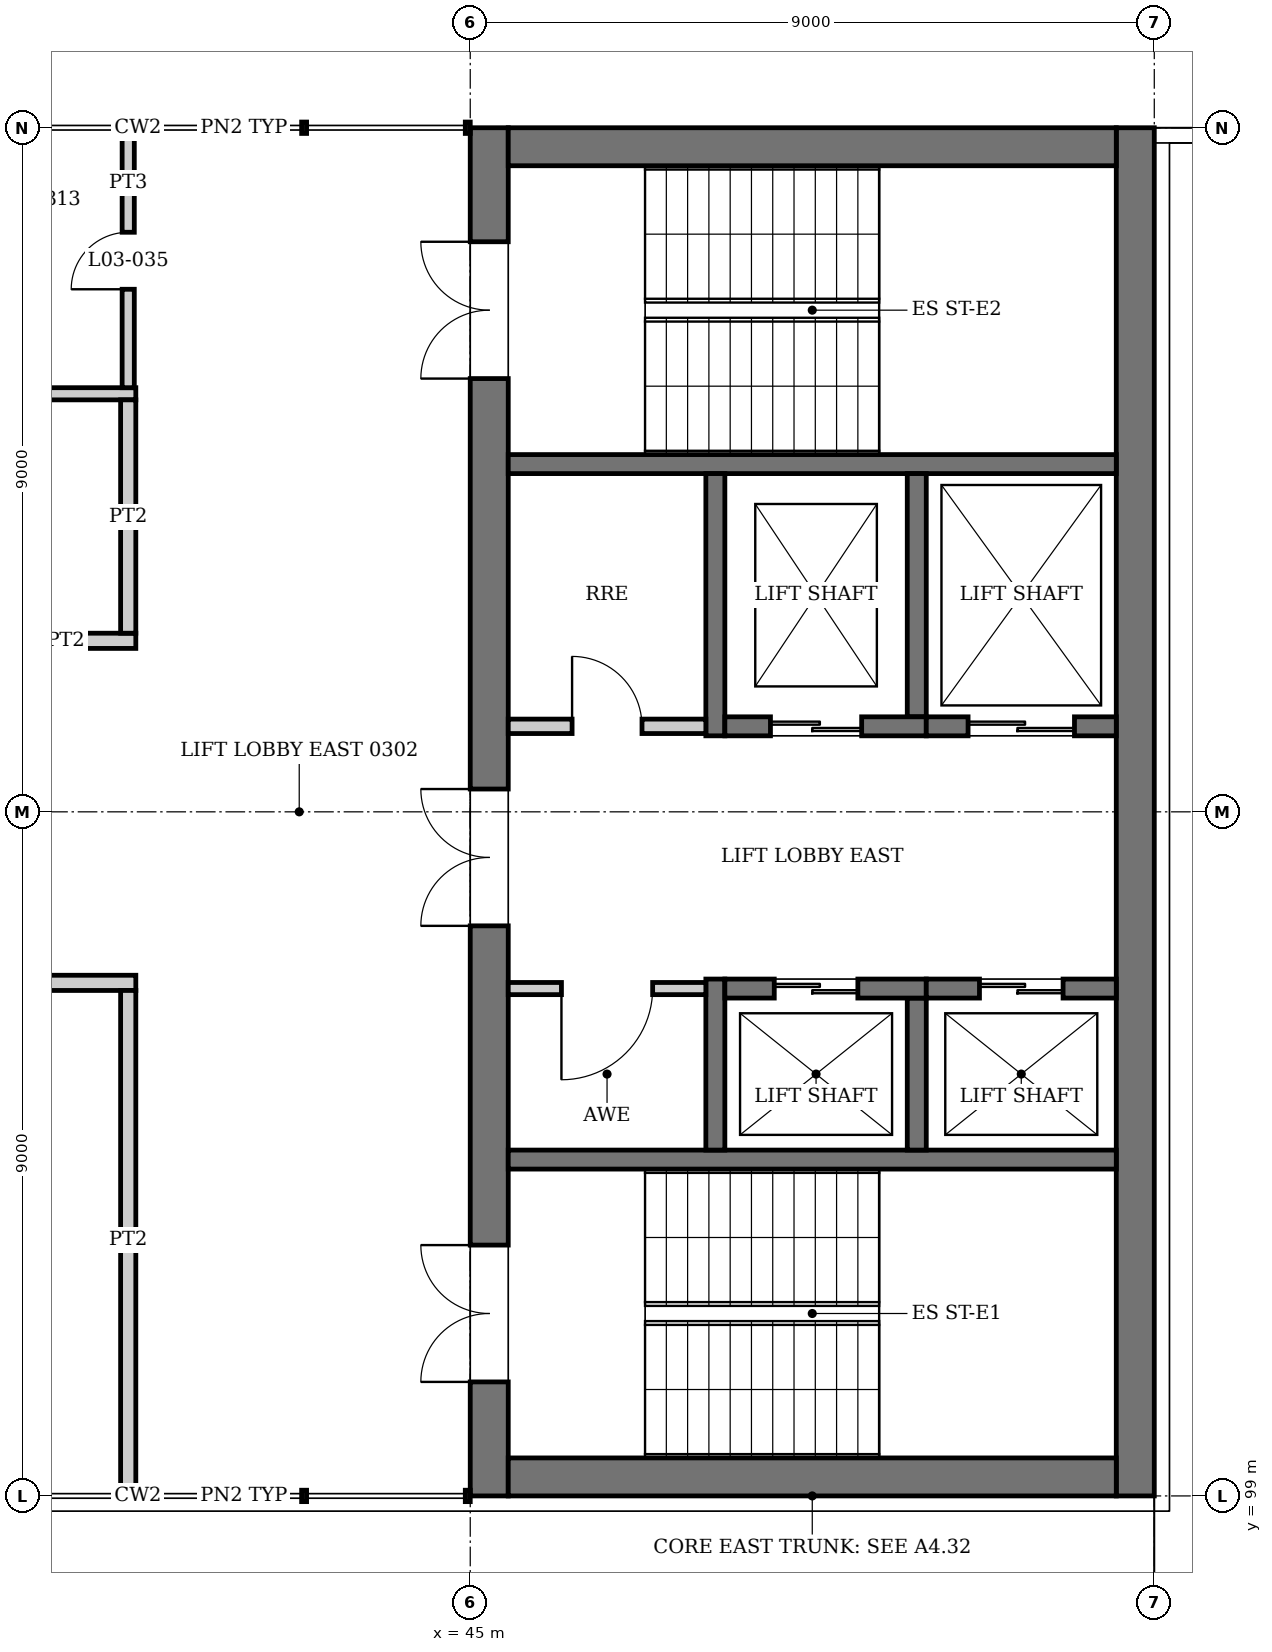
"""IFC4 building model, lengths in metres.
Left out: names, types, materials, properties, quantities, classifications, styles, units other than length and angle.
Written with IfcOpenShell. Run it as: python <this file> out.ifc"""

import sys

from ifc_helpers import new_model, si_unit, direction, frame, frame_2d, origin, place, context, subcontext, project, spatial, rectangle, extrude, element, fill, save


model = new_model("IFC4")
c1 = context("Model", 3, precision=1e-05, world=origin(), true_north=direction((0.0, 1.0)))
c2 = subcontext(c1, "Body", "Model", "MODEL_VIEW")
j1 = project(units=[si_unit("LENGTHUNIT", "METRE"), si_unit("PLANEANGLEUNIT", "RADIAN")], contexts=[c1])
p1 = place(None, origin())
s1 = spatial("IfcSite", under=j1, at=p1, CompositionType="ELEMENT")
p2 = place(p1, origin())
s2 = spatial("IfcBuilding", under=s1, at=p2, CompositionType="ELEMENT")
p3 = place(p2, frame((0.0, 0.0, 15.0)))
s3 = spatial("IfcBuildingStorey", under=s2, at=p3, CompositionType="ELEMENT", Elevation=15.0)
p4 = place(p3, frame((45.25, 99.0, 0.0), z_axis=(0.0, 0.0, 1.0), x_axis=(0.0, 1.0, 0.0)))
e1 = element("IfcWall", 1, at=p4, inside=s3, PredefinedType="SHEAR", context=c2, shape_type="SweptSolid", body=[
    extrude(rectangle(XDim=18.0, YDim=0.5, at=frame_2d((9.0, 0.0))), origin(), (0.0, 0.0, 1.0), 4.2),
])
p5 = place(p4, frame((1.5, 0.0, 0.0)))
e2 = element("IfcOpeningElement", 2, at=p5, cuts=e1, PredefinedType="OPENING", context=c2, shape_type="SweptSolid", body=[
    extrude(rectangle(XDim=1.8, YDim=2.1, at=frame_2d((0.9, 1.05))), frame((0.0, 0.26, 0.0), z_axis=(0.0, -1.0, 0.0), x_axis=(1.0, 0.0, 0.0)), (0.0, 0.0, 1.0), 0.52),
])
p6 = place(p4, frame((14.7, 0.0, 0.0)))
e3 = element("IfcOpeningElement", 3, at=p6, cuts=e1, PredefinedType="OPENING", context=c2, shape_type="SweptSolid", body=[
    extrude(rectangle(XDim=1.8, YDim=2.1, at=frame_2d((0.9, 1.05))), frame((0.0, 0.26, 0.0), z_axis=(0.0, -1.0, 0.0), x_axis=(1.0, 0.0, 0.0)), (0.0, 0.0, 1.0), 0.52),
])
p7 = place(p4, frame((7.5, 0.0, 0.0)))
e4 = element("IfcOpeningElement", 4, at=p7, cuts=e1, PredefinedType="OPENING", context=c2, shape_type="SweptSolid", body=[
    extrude(rectangle(XDim=1.8, YDim=2.1, at=frame_2d((0.9, 1.05))), frame((0.0, 0.26, 0.0), z_axis=(0.0, -1.0, 0.0), x_axis=(1.0, 0.0, 0.0)), (0.0, 0.0, 1.0), 0.52),
])
p8 = place(p3, frame((53.75, 99.0, 0.0), z_axis=(0.0, 0.0, 1.0), x_axis=(0.0, 1.0, 0.0)))
e5 = element("IfcWall", 5, at=p8, inside=s3, PredefinedType="SHEAR", context=c2, shape_type="SweptSolid", body=[
    extrude(rectangle(XDim=18.0, YDim=0.5, at=frame_2d((9.0, 0.0))), origin(), (0.0, 0.0, 1.0), 4.2),
])
for number, where, z_axis, x_axis in (
    (6, (45.5, 99.25, 0.0), (0.0, 0.0, 1.0), (1.0, 0.0, 0.0)),
    (7, (45.5, 116.75, 0.0), (0.0, 0.0, 1.0), (1.0, 0.0, 0.0)),
):
    element("IfcWall", number, at=place(p3, frame(where, z_axis=z_axis, x_axis=x_axis)), inside=s3, PredefinedType="SHEAR", context=c2, shape_type="SweptSolid", body=[
        extrude(rectangle(XDim=8.0, YDim=0.5, at=frame_2d((4.0, 0.0))), origin(), (0.0, 0.0, 1.0), 4.2),
    ])
p9 = place(p3, frame((54.0, 116.9, 0.0), z_axis=(0.0, 0.0, 1.0), x_axis=(1.0, 0.0, 0.0)))
e8 = element("IfcWall", 8, at=p9, inside=s3, PredefinedType="PARAPET", context=c2, shape_type="SweptSolid", body=[
    extrude(rectangle(XDim=9.0, YDim=0.2, at=frame_2d((4.5, 0.0))), origin(), (0.0, 0.0, 1.0), 1.14),
])
for number, where, z_axis, x_axis in (
    (9, (45.5, 103.425, 0.0), (0.0, 0.0, 1.0), (1.0, 0.0, 0.0)),
    (10, (45.5, 112.575, 0.0), (0.0, 0.0, 1.0), (1.0, 0.0, 0.0)),
):
    element("IfcWall", number, at=place(p3, frame(where, z_axis=z_axis, x_axis=x_axis)), inside=s3, PredefinedType="SOLIDWALL", context=c2, shape_type="SweptSolid", body=[
        extrude(rectangle(XDim=8.0, YDim=0.25, at=frame_2d((4.0, 0.0))), origin(), (0.0, 0.0, 1.0), 3.95),
    ])
p10 = place(p3, frame((48.225, 103.55, 0.0), z_axis=(0.0, 0.0, 1.0), x_axis=(0.0, 1.0, 0.0)))
e11 = element("IfcWall", 11, at=p10, inside=s3, PredefinedType="SOLIDWALL", context=c2, shape_type="SweptSolid", body=[
    extrude(rectangle(XDim=2.25, YDim=0.25, at=frame_2d((1.125, 0.0))), origin(), (0.0, 0.0, 1.0), 4.2),
])
p11 = place(p3, frame((50.875, 103.55, 0.0), z_axis=(0.0, 0.0, 1.0), x_axis=(0.0, 1.0, 0.0)))
e12 = element("IfcWall", 12, at=p11, inside=s3, PredefinedType="SOLIDWALL", context=c2, shape_type="SweptSolid", body=[
    extrude(rectangle(XDim=2.0, YDim=0.25, at=frame_2d((1.0, 0.0))), origin(), (0.0, 0.0, 1.0), 4.2),
])
p12 = place(p3, frame((48.35, 105.675, 0.0), z_axis=(0.0, 0.0, 1.0), x_axis=(1.0, 0.0, 0.0)))
e13 = element("IfcWall", 13, at=p12, inside=s3, PredefinedType="SOLIDWALL", context=c2, shape_type="SweptSolid", body=[
    extrude(rectangle(XDim=2.65, YDim=0.25, at=frame_2d((1.325, 0.0))), origin(), (0.0, 0.0, 1.0), 4.2),
])
p13 = place(p12, frame((0.65, 0.0, 0.0)))
e14 = element("IfcOpeningElement", 14, at=p13, cuts=e13, PredefinedType="OPENING", context=c2, shape_type="SweptSolid", body=[
    extrude(rectangle(XDim=1.1, YDim=2.1, at=frame_2d((0.55, 1.05))), frame((0.0, 0.135, 0.0), z_axis=(0.0, -1.0, 0.0), x_axis=(1.0, 0.0, 0.0)), (0.0, 0.0, 1.0), 0.27),
])
p14 = place(p3, frame((51.0, 105.675, 0.0), z_axis=(0.0, 0.0, 1.0), x_axis=(1.0, 0.0, 0.0)))
e15 = element("IfcWall", 15, at=p14, inside=s3, PredefinedType="SOLIDWALL", context=c2, shape_type="SweptSolid", body=[
    extrude(rectangle(XDim=2.5, YDim=0.25, at=frame_2d((1.25, 0.0))), origin(), (0.0, 0.0, 1.0), 4.2),
])
p15 = place(p14, frame((0.7, 0.0, 0.0)))
e16 = element("IfcOpeningElement", 16, at=p15, cuts=e15, PredefinedType="OPENING", context=c2, shape_type="SweptSolid", body=[
    extrude(rectangle(XDim=1.1, YDim=2.1, at=frame_2d((0.55, 1.05))), frame((0.0, 0.135, 0.0), z_axis=(0.0, -1.0, 0.0), x_axis=(1.0, 0.0, 0.0)), (0.0, 0.0, 1.0), 0.27),
])
p16 = place(p3, frame((48.225, 109.0, 0.0), z_axis=(0.0, 0.0, 1.0), x_axis=(0.0, 1.0, 0.0)))
e17 = element("IfcWall", 17, at=p16, inside=s3, PredefinedType="SOLIDWALL", context=c2, shape_type="SweptSolid", body=[
    extrude(rectangle(XDim=3.45, YDim=0.25, at=frame_2d((1.725, 0.0))), origin(), (0.0, 0.0, 1.0), 4.2),
])
p17 = place(p3, frame((50.875, 109.25, 0.0), z_axis=(0.0, 0.0, 1.0), x_axis=(0.0, 1.0, 0.0)))
e18 = element("IfcWall", 18, at=p17, inside=s3, PredefinedType="SOLIDWALL", context=c2, shape_type="SweptSolid", body=[
    extrude(rectangle(XDim=3.2, YDim=0.25, at=frame_2d((1.6, 0.0))), origin(), (0.0, 0.0, 1.0), 4.2),
])
p18 = place(p3, frame((48.35, 109.125, 0.0), z_axis=(0.0, 0.0, 1.0), x_axis=(1.0, 0.0, 0.0)))
e19 = element("IfcWall", 19, at=p18, inside=s3, PredefinedType="SOLIDWALL", context=c2, shape_type="SweptSolid", body=[
    extrude(rectangle(XDim=2.65, YDim=0.25, at=frame_2d((1.325, 0.0))), origin(), (0.0, 0.0, 1.0), 4.2),
])
p19 = place(p18, frame((0.6, 0.0, 0.0)))
e20 = element("IfcOpeningElement", 20, at=p19, cuts=e19, PredefinedType="OPENING", context=c2, shape_type="SweptSolid", body=[
    extrude(rectangle(XDim=1.2, YDim=2.1, at=frame_2d((0.6, 1.05))), frame((0.0, 0.135, 0.0), z_axis=(0.0, -1.0, 0.0), x_axis=(1.0, 0.0, 0.0)), (0.0, 0.0, 1.0), 0.27),
])
p20 = place(p3, frame((51.0, 109.125, 0.0), z_axis=(0.0, 0.0, 1.0), x_axis=(1.0, 0.0, 0.0)))
e21 = element("IfcWall", 21, at=p20, inside=s3, PredefinedType="SOLIDWALL", context=c2, shape_type="SweptSolid", body=[
    extrude(rectangle(XDim=2.5, YDim=0.25, at=frame_2d((1.25, 0.0))), origin(), (0.0, 0.0, 1.0), 4.2),
])
p21 = place(p20, frame((0.55, 0.0, 0.0)))
e22 = element("IfcOpeningElement", 22, at=p21, cuts=e21, PredefinedType="OPENING", context=c2, shape_type="SweptSolid", body=[
    extrude(rectangle(XDim=1.4, YDim=2.4, at=frame_2d((0.7, 1.2))), frame((0.0, 0.135, 0.0), z_axis=(0.0, -1.0, 0.0), x_axis=(1.0, 0.0, 0.0)), (0.0, 0.0, 1.0), 0.27),
])
p22 = place(p3, frame((45.5, 105.675, 0.0), z_axis=(0.0, 0.0, 1.0), x_axis=(1.0, 0.0, 0.0)))
e23 = element("IfcWall", 23, at=p22, inside=s3, PredefinedType="PARTITIONING", context=c2, shape_type="SweptSolid", body=[
    extrude(rectangle(XDim=2.6, YDim=0.16, at=frame_2d((1.3, 0.0))), origin(), (0.0, 0.0, 1.0), 3.95),
])
p23 = place(p22, frame((0.7, 0.0, 0.0)))
e24 = element("IfcOpeningElement", 24, at=p23, cuts=e23, PredefinedType="OPENING", context=c2, shape_type="SweptSolid", body=[
    extrude(rectangle(XDim=1.2, YDim=2.1, at=frame_2d((0.6, 1.05))), frame((0.0, 0.09, 0.0), z_axis=(0.0, -1.0, 0.0), x_axis=(1.0, 0.0, 0.0)), (0.0, 0.0, 1.0), 0.18),
])
p24 = place(p3, frame((45.5, 109.125, 0.0), z_axis=(0.0, 0.0, 1.0), x_axis=(1.0, 0.0, 0.0)))
e25 = element("IfcWall", 25, at=p24, inside=s3, PredefinedType="PARTITIONING", context=c2, shape_type="SweptSolid", body=[
    extrude(rectangle(XDim=2.6, YDim=0.19, at=frame_2d((1.3, 0.0))), origin(), (0.0, 0.0, 1.0), 3.95),
])
p25 = place(p24, frame((0.84, 0.0, 0.0)))
e26 = element("IfcOpeningElement", 26, at=p25, cuts=e25, PredefinedType="OPENING", context=c2, shape_type="SweptSolid", body=[
    extrude(rectangle(XDim=0.92, YDim=2.1, at=frame_2d((0.46, 1.05))), frame((0.0, 0.105, 0.0), z_axis=(0.0, -1.0, 0.0), x_axis=(1.0, 0.0, 0.0)), (0.0, 0.0, 1.0), 0.21),
])
p26 = place(p3, frame((13.4, 105.75, 0.0), z_axis=(0.0, 0.0, 1.0), x_axis=(1.0, 0.0, 0.0)))
e27 = element("IfcWall", 27, at=p26, inside=s3, PredefinedType="PARTITIONING", context=c2, shape_type="SweptSolid", body=[
    extrude(rectangle(XDim=27.2, YDim=0.2, at=frame_2d((13.6, 0.0))), origin(), (0.0, 0.0, 1.0), 3.25),
])
p27 = place(p26, frame((5.95, 0.0, 0.0)))
e28 = element("IfcOpeningElement", 28, at=p27, cuts=e27, PredefinedType="OPENING", context=c2, shape_type="SweptSolid", body=[
    extrude(rectangle(XDim=1.8, YDim=2.1, at=frame_2d((0.9, 1.05))), frame((0.0, 0.11, 0.0), z_axis=(0.0, -1.0, 0.0), x_axis=(1.0, 0.0, 0.0)), (0.0, 0.0, 1.0), 0.22),
])
p28 = place(p26, frame((15.1, 0.0, 0.0)))
e29 = element("IfcOpeningElement", 29, at=p28, cuts=e27, PredefinedType="OPENING", context=c2, shape_type="SweptSolid", body=[
    extrude(rectangle(XDim=1.5, YDim=2.1, at=frame_2d((0.75, 1.05))), frame((0.0, 0.11, 0.0), z_axis=(0.0, -1.0, 0.0), x_axis=(1.0, 0.0, 0.0)), (0.0, 0.0, 1.0), 0.22),
])
p29 = place(p26, frame((19.95, 0.0, 0.0)))
e30 = element("IfcOpeningElement", 30, at=p29, cuts=e27, PredefinedType="OPENING", context=c2, shape_type="SweptSolid", body=[
    extrude(rectangle(XDim=0.8, YDim=2.1, at=frame_2d((0.4, 1.05))), frame((0.0, 0.11, 0.0), z_axis=(0.0, -1.0, 0.0), x_axis=(1.0, 0.0, 0.0)), (0.0, 0.0, 1.0), 0.22),
])
p30 = place(p26, frame((24.45, 0.0, 0.0)))
e31 = element("IfcOpeningElement", 31, at=p30, cuts=e27, PredefinedType="OPENING", context=c2, shape_type="SweptSolid", body=[
    extrude(rectangle(XDim=0.8, YDim=2.1, at=frame_2d((0.4, 1.05))), frame((0.0, 0.11, 0.0), z_axis=(0.0, -1.0, 0.0), x_axis=(1.0, 0.0, 0.0)), (0.0, 0.0, 1.0), 0.22),
])
p31 = place(p3, frame((35.925, 110.25, 0.0), z_axis=(0.0, 0.0, 1.0), x_axis=(1.0, 0.0, 0.0)))
e32 = element("IfcWall", 32, at=p31, inside=s3, PredefinedType="PARTITIONING", context=c2, shape_type="SweptSolid", body=[
    extrude(rectangle(XDim=4.675, YDim=0.2, at=frame_2d((2.337, 0.0))), origin(), (0.0, 0.0, 1.0), 3.25),
])
p32 = place(p31, frame((1.825, 0.0, 0.0)))
e33 = element("IfcOpeningElement", 33, at=p32, cuts=e32, PredefinedType="OPENING", context=c2, shape_type="SweptSolid", body=[
    extrude(rectangle(XDim=1.0, YDim=2.1, at=frame_2d((0.5, 1.05))), frame((0.0, 0.11, 0.0), z_axis=(0.0, -1.0, 0.0), x_axis=(1.0, 0.0, 0.0)), (0.0, 0.0, 1.0), 0.22),
])
p33 = place(p3, frame((35.92, 113.5, 0.0), z_axis=(0.0, 0.0, 1.0), x_axis=(1.0, 0.0, 0.0)))
e34 = element("IfcWall", 34, at=p33, inside=s3, PredefinedType="PARTITIONING", context=c2, shape_type="SweptSolid", body=[
    extrude(rectangle(XDim=4.68, YDim=0.16, at=frame_2d((2.34, 0.0))), origin(), (0.0, 0.0, 1.0), 3.25),
])
p34 = place(p3, frame((40.5, 99.075, 0.0), z_axis=(0.0, 0.0, 1.0), x_axis=(0.0, 1.0, 0.0)))
e35 = element("IfcWall", 35, at=p34, inside=s3, PredefinedType="PARTITIONING", context=c2, shape_type="SweptSolid", body=[
    extrude(rectangle(XDim=6.575, YDim=0.2, at=frame_2d((3.288, 0.0))), origin(), (0.0, 0.0, 1.0), 3.25),
])
p35 = place(p3, frame((40.5, 110.35, 0.0), z_axis=(0.0, 0.0, 1.0), x_axis=(0.0, 1.0, 0.0)))
e36 = element("IfcWall", 36, at=p35, inside=s3, PredefinedType="PARTITIONING", context=c2, shape_type="SweptSolid", body=[
    extrude(rectangle(XDim=3.07, YDim=0.2, at=frame_2d((1.535, 0.0))), origin(), (0.0, 0.0, 1.0), 3.25),
])
p36 = place(p3, frame((40.5, 113.58, 0.0), z_axis=(0.0, 0.0, 1.0), x_axis=(0.0, 1.0, 0.0)))
e37 = element("IfcWall", 37, at=p36, inside=s3, PredefinedType="PARTITIONING", context=c2, shape_type="SweptSolid", body=[
    extrude(rectangle(XDim=3.345, YDim=0.16, at=frame_2d((1.672, 0.0))), origin(), (0.0, 0.0, 1.0), 3.25),
])
p37 = place(p36, frame((1.295, 0.0, 0.0)))
e38 = element("IfcOpeningElement", 38, at=p37, cuts=e37, PredefinedType="OPENING", context=c2, shape_type="SweptSolid", body=[
    extrude(rectangle(XDim=0.75, YDim=2.1, at=frame_2d((0.375, 1.05))), frame((0.0, 0.09, 0.0), z_axis=(0.0, -1.0, 0.0), x_axis=(1.0, 0.0, 0.0)), (0.0, 0.0, 1.0), 0.18),
])
p38 = place(p13, origin())
e39 = element("IfcDoor", 39, at=p38, inside=s3, OperationType="DOUBLE_DOOR_SLIDING", PredefinedType="DOOR", context=c2, shape_type="SweptSolid", body=[
    extrude(rectangle(XDim=1.1, YDim=2.1, at=frame_2d((0.55, 1.05))), frame((0.0, 0.025, 0.0), z_axis=(0.0, -1.0, 0.0), x_axis=(1.0, 0.0, 0.0)), (0.0, 0.0, 1.0), 0.05),
])
fill(e14, e39)
p39 = place(p15, origin())
e40 = element("IfcDoor", 40, at=p39, inside=s3, OperationType="DOUBLE_DOOR_SLIDING", PredefinedType="DOOR", context=c2, shape_type="SweptSolid", body=[
    extrude(rectangle(XDim=1.1, YDim=2.1, at=frame_2d((0.55, 1.05))), frame((0.0, 0.025, 0.0), z_axis=(0.0, -1.0, 0.0), x_axis=(1.0, 0.0, 0.0)), (0.0, 0.0, 1.0), 0.05),
])
fill(e16, e40)
p40 = place(p19, origin())
e41 = element("IfcDoor", 41, at=p40, inside=s3, OperationType="DOUBLE_DOOR_SLIDING", PredefinedType="DOOR", context=c2, shape_type="SweptSolid", body=[
    extrude(rectangle(XDim=1.2, YDim=2.1, at=frame_2d((0.6, 1.05))), frame((0.0, 0.025, 0.0), z_axis=(0.0, -1.0, 0.0), x_axis=(1.0, 0.0, 0.0)), (0.0, 0.0, 1.0), 0.05),
])
fill(e20, e41)
p41 = place(p21, origin())
e42 = element("IfcDoor", 42, at=p41, inside=s3, OperationType="DOUBLE_DOOR_SLIDING", PredefinedType="DOOR", context=c2, shape_type="SweptSolid", body=[
    extrude(rectangle(XDim=1.4, YDim=2.4, at=frame_2d((0.7, 1.2))), frame((0.0, 0.025, 0.0), z_axis=(0.0, -1.0, 0.0), x_axis=(1.0, 0.0, 0.0)), (0.0, 0.0, 1.0), 0.05),
])
fill(e22, e42)
p42 = place(p37, origin())
e43 = element("IfcDoor", 43, at=p42, inside=s3, OperationType="SINGLE_SWING_LEFT", PredefinedType="DOOR", context=c2, shape_type="SweptSolid", body=[
    extrude(rectangle(XDim=0.75, YDim=2.1, at=frame_2d((0.375, 1.05))), frame((0.0, 0.025, 0.0), z_axis=(0.0, -1.0, 0.0), x_axis=(1.0, 0.0, 0.0)), (0.0, 0.0, 1.0), 0.05),
])
fill(e38, e43)
p43 = place(p5, origin())
e44 = element("IfcDoor", 44, at=p43, inside=s3, OperationType="DOUBLE_DOOR_SINGLE_SWING", PredefinedType="DOOR", context=c2, shape_type="SweptSolid", body=[
    extrude(rectangle(XDim=1.8, YDim=2.1, at=frame_2d((0.9, 1.05))), frame((0.0, 0.025, 0.0), z_axis=(0.0, -1.0, 0.0), x_axis=(1.0, 0.0, 0.0)), (0.0, 0.0, 1.0), 0.05),
])
fill(e2, e44)
p44 = place(p6, origin())
e45 = element("IfcDoor", 45, at=p44, inside=s3, OperationType="DOUBLE_DOOR_SINGLE_SWING", PredefinedType="DOOR", context=c2, shape_type="SweptSolid", body=[
    extrude(rectangle(XDim=1.8, YDim=2.1, at=frame_2d((0.9, 1.05))), frame((0.0, 0.025, 0.0), z_axis=(0.0, -1.0, 0.0), x_axis=(1.0, 0.0, 0.0)), (0.0, 0.0, 1.0), 0.05),
])
fill(e3, e45)
p45 = place(p7, origin())
e46 = element("IfcDoor", 46, at=p45, inside=s3, OperationType="DOUBLE_DOOR_SINGLE_SWING", PredefinedType="DOOR", context=c2, shape_type="SweptSolid", body=[
    extrude(rectangle(XDim=1.8, YDim=2.1, at=frame_2d((0.9, 1.05))), frame((0.0, 0.025, 0.0), z_axis=(0.0, -1.0, 0.0), x_axis=(1.0, 0.0, 0.0)), (0.0, 0.0, 1.0), 0.05),
])
fill(e4, e46)
p46 = place(p23, frame((1.2, 0.0, 0.0), z_axis=(0.0, 0.0, 1.0), x_axis=(-1.0, 0.0, 0.0)))
e47 = element("IfcDoor", 47, at=p46, inside=s3, OperationType="SINGLE_SWING_RIGHT", PredefinedType="DOOR", context=c2, shape_type="SweptSolid", body=[
    extrude(rectangle(XDim=1.2, YDim=2.1, at=frame_2d((0.6, 1.05))), frame((0.0, 0.025, 0.0), z_axis=(0.0, -1.0, 0.0), x_axis=(1.0, 0.0, 0.0)), (0.0, 0.0, 1.0), 0.05),
])
fill(e24, e47)
p47 = place(p25, origin())
e48 = element("IfcDoor", 48, at=p47, inside=s3, OperationType="SINGLE_SWING_LEFT", PredefinedType="DOOR", context=c2, shape_type="SweptSolid", body=[
    extrude(rectangle(XDim=0.92, YDim=2.1, at=frame_2d((0.46, 1.05))), frame((0.0, 0.025, 0.0), z_axis=(0.0, -1.0, 0.0), x_axis=(1.0, 0.0, 0.0)), (0.0, 0.0, 1.0), 0.05),
])
fill(e26, e48)
save(model, sys.argv[1])
